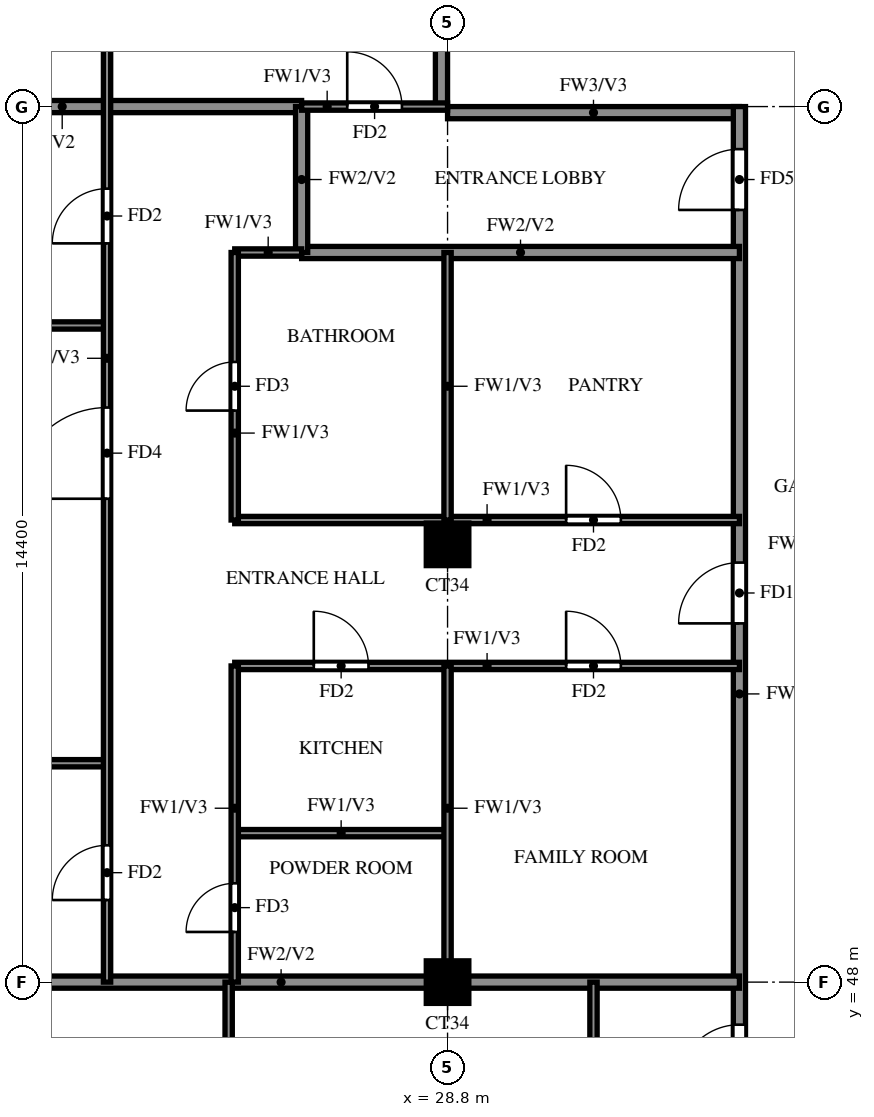
"""IFC4 building model, lengths in metres.
Left out: names, types, materials, properties, quantities, classifications, styles, units other than length and angle.
Written with IfcOpenShell. Run it as: python <this file> out.ifc"""

import sys

from ifc_helpers import new_model, si_unit, direction, frame, frame_2d, origin, origin_2d, place, context, subcontext, project, spatial, rectangle, extrude, source, transform, mapped, element, fill, save


model = new_model("IFC4")
c1 = context("Model", 3, precision=1e-05, world=origin(), true_north=direction((0.0, 1.0)))
c2 = subcontext(c1, "Body", "Model", "MODEL_VIEW")
j1 = project(units=[si_unit("LENGTHUNIT", "METRE"), si_unit("PLANEANGLEUNIT", "RADIAN")], contexts=[c1])
p1 = place(None, origin())
s1 = spatial("IfcSite", under=j1, at=p1, CompositionType="ELEMENT")
p2 = place(p1, origin())
s2 = spatial("IfcBuilding", under=s1, at=p2, CompositionType="ELEMENT")
p3 = place(p2, frame((0.0, 0.0, 264.0)))
s3 = spatial("IfcBuildingStorey", under=s2, at=p3, CompositionType="ELEMENT", Elevation=264.0)
m1 = source(origin(), c2, "Body", "SweptSolid", [
    extrude(rectangle(XDim=0.7, YDim=0.7, at=origin_2d()), origin(), (0.0, 0.0, 1.0), 3.22),
])
for number, where, z_axis, x_axis in (
    (1, (28.8, 48.0, 0.0), (0.0, 0.0, 1.0), (1.0, 0.0, 0.0)),
    (2, (28.8, 55.2, 0.0), (0.0, 0.0, 1.0), (1.0, 0.0, 0.0)),
):
    element("IfcColumn", number, at=place(p3, frame(where, z_axis=z_axis, x_axis=x_axis)), inside=s3, PredefinedType="COLUMN", context=c2, shape_type="MappedRepresentation", body=[
        mapped(m1, transform((0.0, 0.0, 0.0))),
    ])
p4 = place(p3, frame((28.8, 62.3, 0.0), z_axis=(0.0, 0.0, 1.0), x_axis=(1.0, 0.0, 0.0)))
e3 = element("IfcWall", 3, at=p4, inside=s3, PredefinedType="SOLIDWALL", context=c2, shape_type="SweptSolid", body=[
    extrude(rectangle(XDim=4.8, YDim=0.2, at=frame_2d((2.4, 0.0))), origin(), (0.0, 0.0, 1.0), 3.22),
])
p5 = place(p3, frame((28.7, 62.4, 0.0), z_axis=(0.0, 0.0, 1.0), x_axis=(0.0, 1.0, 0.0)))
e4 = element("IfcWall", 4, at=p5, inside=s3, PredefinedType="SOLIDWALL", context=c2, shape_type="SweptSolid", body=[
    extrude(rectangle(XDim=15.6, YDim=0.2, at=frame_2d((7.8, 0.0))), origin(), (0.0, 0.0, 1.0), 3.22),
])
p6 = place(p3, frame((33.6, 45.6, 0.0), z_axis=(0.0, 0.0, 1.0), x_axis=(0.0, 1.0, 0.0)))
e5 = element("IfcWall", 5, at=p6, inside=s3, PredefinedType="SOLIDWALL", context=c2, shape_type="SweptSolid", body=[
    extrude(rectangle(XDim=16.8, YDim=0.2, at=frame_2d((8.4, 0.0))), origin(), (0.0, 0.0, 1.0), 3.22),
])
p7 = place(p6, frame((0.7, 0.0, 0.0)))
e6 = element("IfcOpeningElement", 6, at=p7, cuts=e5, PredefinedType="OPENING", context=c2, shape_type="SweptSolid", body=[
    extrude(rectangle(XDim=1.0, YDim=2.1, at=frame_2d((0.5, 1.05))), frame((0.0, 0.11, 0.0), z_axis=(0.0, -1.0, 0.0), x_axis=(1.0, 0.0, 0.0)), (0.0, 0.0, 1.0), 0.22),
])
p8 = place(p6, frame((8.3, 0.0, 0.0)))
e7 = element("IfcOpeningElement", 7, at=p8, cuts=e5, PredefinedType="OPENING", context=c2, shape_type="SweptSolid", body=[
    extrude(rectangle(XDim=1.0, YDim=2.1, at=frame_2d((0.5, 1.05))), frame((0.0, 0.11, 0.0), z_axis=(0.0, -1.0, 0.0), x_axis=(1.0, 0.0, 0.0)), (0.0, 0.0, 1.0), 0.22),
])
p9 = place(p6, frame((15.1, 0.0, 0.0)))
e8 = element("IfcOpeningElement", 8, at=p9, cuts=e5, PredefinedType="OPENING", context=c2, shape_type="SweptSolid", body=[
    extrude(rectangle(XDim=1.0, YDim=2.1, at=frame_2d((0.5, 1.05))), frame((0.0, 0.11, 0.0), z_axis=(0.0, -1.0, 0.0), x_axis=(1.0, 0.0, 0.0)), (0.0, 0.0, 1.0), 0.22),
])
p10 = place(p3, frame((18.525, 48.0, 0.0), z_axis=(0.0, 0.0, 1.0), x_axis=(1.0, 0.0, 0.0)))
e9 = element("IfcWall", 9, at=p10, inside=s3, PredefinedType="SOLIDWALL", context=c2, shape_type="SweptSolid", body=[
    extrude(rectangle(XDim=15.075, YDim=0.2, at=frame_2d((7.538, 0.0))), origin(), (0.0, 0.0, 1.0), 3.22),
])
p11 = place(p3, frame((26.4, 60.0, 0.0), z_axis=(0.0, 0.0, 1.0), x_axis=(1.0, 0.0, 0.0)))
e10 = element("IfcWall", 10, at=p11, inside=s3, PredefinedType="SOLIDWALL", context=c2, shape_type="SweptSolid", body=[
    extrude(rectangle(XDim=7.2, YDim=0.2, at=frame_2d((3.6, 0.0))), origin(), (0.0, 0.0, 1.0), 3.22),
])
p12 = place(p3, frame((18.525, 62.4, 0.0), z_axis=(0.0, 0.0, 1.0), x_axis=(1.0, 0.0, 0.0)))
e11 = element("IfcWall", 11, at=p12, inside=s3, PredefinedType="SOLIDWALL", context=c2, shape_type="SweptSolid", body=[
    extrude(rectangle(XDim=7.875, YDim=0.2, at=frame_2d((3.938, 0.0))), origin(), (0.0, 0.0, 1.0), 3.22),
])
p13 = place(p3, frame((26.4, 60.0, 0.0), z_axis=(0.0, 0.0, 1.0), x_axis=(0.0, 1.0, 0.0)))
e12 = element("IfcWall", 12, at=p13, inside=s3, PredefinedType="SOLIDWALL", context=c2, shape_type="SweptSolid", body=[
    extrude(rectangle(XDim=2.4, YDim=0.2, at=frame_2d((1.2, 0.0))), origin(), (0.0, 0.0, 1.0), 3.22),
])
p14 = place(p3, frame((25.3, 50.45, 0.0), z_axis=(0.0, 0.0, 1.0), x_axis=(1.0, 0.0, 0.0)))
e13 = element("IfcWall", 13, at=p14, inside=s3, PredefinedType="PARTITIONING", context=c2, shape_type="SweptSolid", body=[
    extrude(rectangle(XDim=3.5, YDim=0.12, at=frame_2d((1.75, 0.0))), origin(), (0.0, 0.0, 1.0), 3.22),
])
p15 = place(p3, frame((18.525, 51.6, 0.0), z_axis=(0.0, 0.0, 1.0), x_axis=(1.0, 0.0, 0.0)))
e14 = element("IfcWall", 14, at=p15, inside=s3, PredefinedType="PARTITIONING", context=c2, shape_type="SweptSolid", body=[
    extrude(rectangle(XDim=4.675, YDim=0.12, at=frame_2d((2.337, 0.0))), origin(), (0.0, 0.0, 1.0), 2.32),
])
p16 = place(p3, frame((25.3, 53.2, 0.0), z_axis=(0.0, 0.0, 1.0), x_axis=(1.0, 0.0, 0.0)))
e15 = element("IfcWall", 15, at=p16, inside=s3, PredefinedType="PARTITIONING", context=c2, shape_type="SweptSolid", body=[
    extrude(rectangle(XDim=8.3, YDim=0.12, at=frame_2d((4.15, 0.0))), origin(), (0.0, 0.0, 1.0), 3.22),
])
p17 = place(p16, frame((1.3, 0.0, 0.0)))
e16 = element("IfcOpeningElement", 16, at=p17, cuts=e15, PredefinedType="OPENING", context=c2, shape_type="SweptSolid", body=[
    extrude(rectangle(XDim=0.9, YDim=2.1, at=frame_2d((0.45, 1.05))), frame((0.0, 0.07, 0.0), z_axis=(0.0, -1.0, 0.0), x_axis=(1.0, 0.0, 0.0)), (0.0, 0.0, 1.0), 0.14),
])
p18 = place(p16, frame((5.45, 0.0, 0.0)))
e17 = element("IfcOpeningElement", 17, at=p18, cuts=e15, PredefinedType="OPENING", context=c2, shape_type="SweptSolid", body=[
    extrude(rectangle(XDim=0.9, YDim=2.1, at=frame_2d((0.45, 1.05))), frame((0.0, 0.07, 0.0), z_axis=(0.0, -1.0, 0.0), x_axis=(1.0, 0.0, 0.0)), (0.0, 0.0, 1.0), 0.14),
])
p19 = place(p3, frame((25.3, 55.6, 0.0), z_axis=(0.0, 0.0, 1.0), x_axis=(1.0, 0.0, 0.0)))
e18 = element("IfcWall", 18, at=p19, inside=s3, PredefinedType="PARTITIONING", context=c2, shape_type="SweptSolid", body=[
    extrude(rectangle(XDim=8.3, YDim=0.12, at=frame_2d((4.15, 0.0))), origin(), (0.0, 0.0, 1.0), 3.22),
])
p20 = place(p19, frame((5.45, 0.0, 0.0)))
e19 = element("IfcOpeningElement", 19, at=p20, cuts=e18, PredefinedType="OPENING", context=c2, shape_type="SweptSolid", body=[
    extrude(rectangle(XDim=0.9, YDim=2.1, at=frame_2d((0.45, 1.05))), frame((0.0, 0.07, 0.0), z_axis=(0.0, -1.0, 0.0), x_axis=(1.0, 0.0, 0.0)), (0.0, 0.0, 1.0), 0.14),
])
p21 = place(p3, frame((18.525, 58.8, 0.0), z_axis=(0.0, 0.0, 1.0), x_axis=(1.0, 0.0, 0.0)))
e20 = element("IfcWall", 20, at=p21, inside=s3, PredefinedType="PARTITIONING", context=c2, shape_type="SweptSolid", body=[
    extrude(rectangle(XDim=4.675, YDim=0.12, at=frame_2d((2.337, 0.0))), origin(), (0.0, 0.0, 1.0), 2.32),
])
p22 = place(p3, frame((25.3, 60.0, 0.0), z_axis=(0.0, 0.0, 1.0), x_axis=(1.0, 0.0, 0.0)))
e21 = element("IfcWall", 21, at=p22, inside=s3, PredefinedType="PARTITIONING", context=c2, shape_type="SweptSolid", body=[
    extrude(rectangle(XDim=1.1, YDim=0.12, at=frame_2d((0.55, 0.0))), origin(), (0.0, 0.0, 1.0), 3.22),
])
p23 = place(p3, frame((26.4, 62.4, 0.0), z_axis=(0.0, 0.0, 1.0), x_axis=(1.0, 0.0, 0.0)))
e22 = element("IfcWall", 22, at=p23, inside=s3, PredefinedType="PARTITIONING", context=c2, shape_type="SweptSolid", body=[
    extrude(rectangle(XDim=2.4, YDim=0.12, at=frame_2d((1.2, 0.0))), origin(), (0.0, 0.0, 1.0), 3.22),
])
p24 = place(p23, frame((0.75, 0.0, 0.0)))
e23 = element("IfcOpeningElement", 23, at=p24, cuts=e22, PredefinedType="OPENING", context=c2, shape_type="SweptSolid", body=[
    extrude(rectangle(XDim=0.9, YDim=2.1, at=frame_2d((0.45, 1.05))), frame((0.0, 0.07, 0.0), z_axis=(0.0, -1.0, 0.0), x_axis=(1.0, 0.0, 0.0)), (0.0, 0.0, 1.0), 0.14),
])
p25 = place(p3, frame((23.2, 48.0, 0.0), z_axis=(0.0, 0.0, 1.0), x_axis=(0.0, 1.0, 0.0)))
e24 = element("IfcWall", 24, at=p25, inside=s3, PredefinedType="PARTITIONING", context=c2, shape_type="SweptSolid", body=[
    extrude(rectangle(XDim=21.6, YDim=0.12, at=frame_2d((10.8, 0.0))), origin(), (0.0, 0.0, 1.0), 3.22),
])
p26 = place(p25, frame((1.35, 0.0, 0.0)))
e25 = element("IfcOpeningElement", 25, at=p26, cuts=e24, PredefinedType="OPENING", context=c2, shape_type="SweptSolid", body=[
    extrude(rectangle(XDim=0.9, YDim=2.1, at=frame_2d((0.45, 1.05))), frame((0.0, 0.07, 0.0), z_axis=(0.0, -1.0, 0.0), x_axis=(1.0, 0.0, 0.0)), (0.0, 0.0, 1.0), 0.14),
])
p27 = place(p25, frame((7.95, 0.0, 0.0)))
e26 = element("IfcOpeningElement", 26, at=p27, cuts=e24, PredefinedType="OPENING", context=c2, shape_type="SweptSolid", body=[
    extrude(rectangle(XDim=1.5, YDim=2.1, at=frame_2d((0.75, 1.05))), frame((0.0, 0.07, 0.0), z_axis=(0.0, -1.0, 0.0), x_axis=(1.0, 0.0, 0.0)), (0.0, 0.0, 1.0), 0.14),
])
p28 = place(p25, frame((12.15, 0.0, 0.0)))
e27 = element("IfcOpeningElement", 27, at=p28, cuts=e24, PredefinedType="OPENING", context=c2, shape_type="SweptSolid", body=[
    extrude(rectangle(XDim=0.9, YDim=2.1, at=frame_2d((0.45, 1.05))), frame((0.0, 0.07, 0.0), z_axis=(0.0, -1.0, 0.0), x_axis=(1.0, 0.0, 0.0)), (0.0, 0.0, 1.0), 0.14),
])
p29 = place(p25, frame((15.75, 0.0, 0.0)))
e28 = element("IfcOpeningElement", 28, at=p29, cuts=e24, PredefinedType="OPENING", context=c2, shape_type="SweptSolid", body=[
    extrude(rectangle(XDim=0.9, YDim=2.1, at=frame_2d((0.45, 1.05))), frame((0.0, 0.07, 0.0), z_axis=(0.0, -1.0, 0.0), x_axis=(1.0, 0.0, 0.0)), (0.0, 0.0, 1.0), 0.14),
])
p30 = place(p25, frame((19.35, 0.0, 0.0)))
e29 = element("IfcOpeningElement", 29, at=p30, cuts=e24, PredefinedType="OPENING", context=c2, shape_type="SweptSolid", body=[
    extrude(rectangle(XDim=0.9, YDim=2.1, at=frame_2d((0.45, 1.05))), frame((0.0, 0.07, 0.0), z_axis=(0.0, -1.0, 0.0), x_axis=(1.0, 0.0, 0.0)), (0.0, 0.0, 1.0), 0.14),
])
p31 = place(p3, frame((25.2, 39.725, 0.0), z_axis=(0.0, 0.0, 1.0), x_axis=(0.0, 1.0, 0.0)))
e30 = element("IfcWall", 30, at=p31, inside=s3, PredefinedType="PARTITIONING", context=c2, shape_type="SweptSolid", body=[
    extrude(rectangle(XDim=8.275, YDim=0.12, at=frame_2d((4.137, 0.0))), origin(), (0.0, 0.0, 1.0), 3.22),
])
p32 = place(p31, frame((4.525, 0.0, 0.0)))
e31 = element("IfcOpeningElement", 31, at=p32, cuts=e30, PredefinedType="OPENING", context=c2, shape_type="SweptSolid", body=[
    extrude(rectangle(XDim=0.9, YDim=2.1, at=frame_2d((0.45, 1.05))), frame((0.0, 0.07, 0.0), z_axis=(0.0, -1.0, 0.0), x_axis=(1.0, 0.0, 0.0)), (0.0, 0.0, 1.0), 0.14),
])
p33 = place(p3, frame((25.3, 48.0, 0.0), z_axis=(0.0, 0.0, 1.0), x_axis=(0.0, 1.0, 0.0)))
e32 = element("IfcWall", 32, at=p33, inside=s3, PredefinedType="PARTITIONING", context=c2, shape_type="SweptSolid", body=[
    extrude(rectangle(XDim=5.2, YDim=0.12, at=frame_2d((2.6, 0.0))), origin(), (0.0, 0.0, 1.0), 3.22),
])
p34 = place(p33, frame((0.825, 0.0, 0.0)))
e33 = element("IfcOpeningElement", 33, at=p34, cuts=e32, PredefinedType="OPENING", context=c2, shape_type="SweptSolid", body=[
    extrude(rectangle(XDim=0.8, YDim=2.1, at=frame_2d((0.4, 1.05))), frame((0.0, 0.07, 0.0), z_axis=(0.0, -1.0, 0.0), x_axis=(1.0, 0.0, 0.0)), (0.0, 0.0, 1.0), 0.14),
])
p35 = place(p3, frame((25.3, 55.6, 0.0), z_axis=(0.0, 0.0, 1.0), x_axis=(0.0, 1.0, 0.0)))
e34 = element("IfcWall", 34, at=p35, inside=s3, PredefinedType="PARTITIONING", context=c2, shape_type="SweptSolid", body=[
    extrude(rectangle(XDim=4.4, YDim=0.12, at=frame_2d((2.2, 0.0))), origin(), (0.0, 0.0, 1.0), 3.22),
])
p36 = place(p35, frame((1.8, 0.0, 0.0)))
e35 = element("IfcOpeningElement", 35, at=p36, cuts=e34, PredefinedType="OPENING", context=c2, shape_type="SweptSolid", body=[
    extrude(rectangle(XDim=0.8, YDim=2.1, at=frame_2d((0.4, 1.05))), frame((0.0, 0.07, 0.0), z_axis=(0.0, -1.0, 0.0), x_axis=(1.0, 0.0, 0.0)), (0.0, 0.0, 1.0), 0.14),
])
p37 = place(p3, frame((28.8, 48.0, 0.0), z_axis=(0.0, 0.0, 1.0), x_axis=(0.0, 1.0, 0.0)))
e36 = element("IfcWall", 36, at=p37, inside=s3, PredefinedType="PARTITIONING", context=c2, shape_type="SweptSolid", body=[
    extrude(rectangle(XDim=5.2, YDim=0.12, at=frame_2d((2.6, 0.0))), origin(), (0.0, 0.0, 1.0), 3.22),
])
p38 = place(p3, frame((28.8, 55.6, 0.0), z_axis=(0.0, 0.0, 1.0), x_axis=(0.0, 1.0, 0.0)))
e37 = element("IfcWall", 37, at=p38, inside=s3, PredefinedType="PARTITIONING", context=c2, shape_type="SweptSolid", body=[
    extrude(rectangle(XDim=4.4, YDim=0.12, at=frame_2d((2.2, 0.0))), origin(), (0.0, 0.0, 1.0), 3.22),
])
p39 = place(p3, frame((31.2, 45.6, 0.0), z_axis=(0.0, 0.0, 1.0), x_axis=(0.0, 1.0, 0.0)))
e38 = element("IfcWall", 38, at=p39, inside=s3, PredefinedType="PARTITIONING", context=c2, shape_type="SweptSolid", body=[
    extrude(rectangle(XDim=2.4, YDim=0.12, at=frame_2d((1.2, 0.0))), origin(), (0.0, 0.0, 1.0), 3.22),
])
p40 = place(p7, origin())
e39 = element("IfcDoor", 39, at=p40, inside=s3, OperationType="SINGLE_SWING_LEFT", PredefinedType="DOOR", context=c2, shape_type="SweptSolid", body=[
    extrude(rectangle(XDim=1.0, YDim=2.1, at=frame_2d((0.5, 1.05))), frame((0.0, 0.025, 0.0), z_axis=(0.0, -1.0, 0.0), x_axis=(1.0, 0.0, 0.0)), (0.0, 0.0, 1.0), 0.05),
])
fill(e6, e39)
p41 = place(p8, origin())
e40 = element("IfcDoor", 40, at=p41, inside=s3, OperationType="SINGLE_SWING_LEFT", PredefinedType="DOOR", context=c2, shape_type="SweptSolid", body=[
    extrude(rectangle(XDim=1.0, YDim=2.1, at=frame_2d((0.5, 1.05))), frame((0.0, 0.025, 0.0), z_axis=(0.0, -1.0, 0.0), x_axis=(1.0, 0.0, 0.0)), (0.0, 0.0, 1.0), 0.05),
])
fill(e7, e40)
p42 = place(p26, origin())
e41 = element("IfcDoor", 41, at=p42, inside=s3, OperationType="SINGLE_SWING_RIGHT", PredefinedType="DOOR", context=c2, shape_type="SweptSolid", body=[
    extrude(rectangle(XDim=0.9, YDim=2.1, at=frame_2d((0.45, 1.05))), frame((0.0, 0.025, 0.0), z_axis=(0.0, -1.0, 0.0), x_axis=(1.0, 0.0, 0.0)), (0.0, 0.0, 1.0), 0.05),
])
fill(e25, e41)
p43 = place(p27, origin())
e42 = element("IfcDoor", 42, at=p43, inside=s3, OperationType="SINGLE_SWING_RIGHT", PredefinedType="DOOR", context=c2, shape_type="SweptSolid", body=[
    extrude(rectangle(XDim=1.5, YDim=2.1, at=frame_2d((0.75, 1.05))), frame((0.0, 0.025, 0.0), z_axis=(0.0, -1.0, 0.0), x_axis=(1.0, 0.0, 0.0)), (0.0, 0.0, 1.0), 0.05),
])
fill(e26, e42)
p44 = place(p28, origin())
e43 = element("IfcDoor", 43, at=p44, inside=s3, OperationType="SINGLE_SWING_LEFT", PredefinedType="DOOR", context=c2, shape_type="SweptSolid", body=[
    extrude(rectangle(XDim=0.9, YDim=2.1, at=frame_2d((0.45, 1.05))), frame((0.0, 0.025, 0.0), z_axis=(0.0, -1.0, 0.0), x_axis=(1.0, 0.0, 0.0)), (0.0, 0.0, 1.0), 0.05),
])
fill(e27, e43)
p45 = place(p34, origin())
e44 = element("IfcDoor", 44, at=p45, inside=s3, OperationType="SINGLE_SWING_RIGHT", PredefinedType="DOOR", context=c2, shape_type="SweptSolid", body=[
    extrude(rectangle(XDim=0.8, YDim=2.1, at=frame_2d((0.4, 1.05))), frame((0.0, 0.025, 0.0), z_axis=(0.0, -1.0, 0.0), x_axis=(1.0, 0.0, 0.0)), (0.0, 0.0, 1.0), 0.05),
])
fill(e33, e44)
p46 = place(p17, origin())
e45 = element("IfcDoor", 45, at=p46, inside=s3, OperationType="SINGLE_SWING_LEFT", PredefinedType="DOOR", context=c2, shape_type="SweptSolid", body=[
    extrude(rectangle(XDim=0.9, YDim=2.1, at=frame_2d((0.45, 1.05))), frame((0.0, 0.025, 0.0), z_axis=(0.0, -1.0, 0.0), x_axis=(1.0, 0.0, 0.0)), (0.0, 0.0, 1.0), 0.05),
])
fill(e16, e45)
p47 = place(p36, origin())
e46 = element("IfcDoor", 46, at=p47, inside=s3, OperationType="SINGLE_SWING_LEFT", PredefinedType="DOOR", context=c2, shape_type="SweptSolid", body=[
    extrude(rectangle(XDim=0.8, YDim=2.1, at=frame_2d((0.4, 1.05))), frame((0.0, 0.025, 0.0), z_axis=(0.0, -1.0, 0.0), x_axis=(1.0, 0.0, 0.0)), (0.0, 0.0, 1.0), 0.05),
])
fill(e35, e46)
p48 = place(p18, origin())
e47 = element("IfcDoor", 47, at=p48, inside=s3, OperationType="SINGLE_SWING_RIGHT", PredefinedType="DOOR", context=c2, shape_type="SweptSolid", body=[
    extrude(rectangle(XDim=0.9, YDim=2.1, at=frame_2d((0.45, 1.05))), frame((0.0, 0.025, 0.0), z_axis=(0.0, -1.0, 0.0), x_axis=(1.0, 0.0, 0.0)), (0.0, 0.0, 1.0), 0.05),
])
fill(e17, e47)
p49 = place(p20, origin())
e48 = element("IfcDoor", 48, at=p49, inside=s3, OperationType="SINGLE_SWING_LEFT", PredefinedType="DOOR", context=c2, shape_type="SweptSolid", body=[
    extrude(rectangle(XDim=0.9, YDim=2.1, at=frame_2d((0.45, 1.05))), frame((0.0, 0.025, 0.0), z_axis=(0.0, -1.0, 0.0), x_axis=(1.0, 0.0, 0.0)), (0.0, 0.0, 1.0), 0.05),
])
fill(e19, e48)
p50 = place(p24, origin())
e49 = element("IfcDoor", 49, at=p50, inside=s3, OperationType="SINGLE_SWING_LEFT", PredefinedType="DOOR", context=c2, shape_type="SweptSolid", body=[
    extrude(rectangle(XDim=0.9, YDim=2.1, at=frame_2d((0.45, 1.05))), frame((0.0, 0.025, 0.0), z_axis=(0.0, -1.0, 0.0), x_axis=(1.0, 0.0, 0.0)), (0.0, 0.0, 1.0), 0.05),
])
fill(e23, e49)
p51 = place(p9, origin())
e50 = element("IfcDoor", 50, at=p51, inside=s3, OperationType="SINGLE_SWING_RIGHT", PredefinedType="DOOR", context=c2, shape_type="SweptSolid", body=[
    extrude(rectangle(XDim=1.0, YDim=2.1, at=frame_2d((0.5, 1.05))), frame((0.0, 0.025, 0.0), z_axis=(0.0, -1.0, 0.0), x_axis=(1.0, 0.0, 0.0)), (0.0, 0.0, 1.0), 0.05),
])
fill(e8, e50)
save(model, sys.argv[1])
